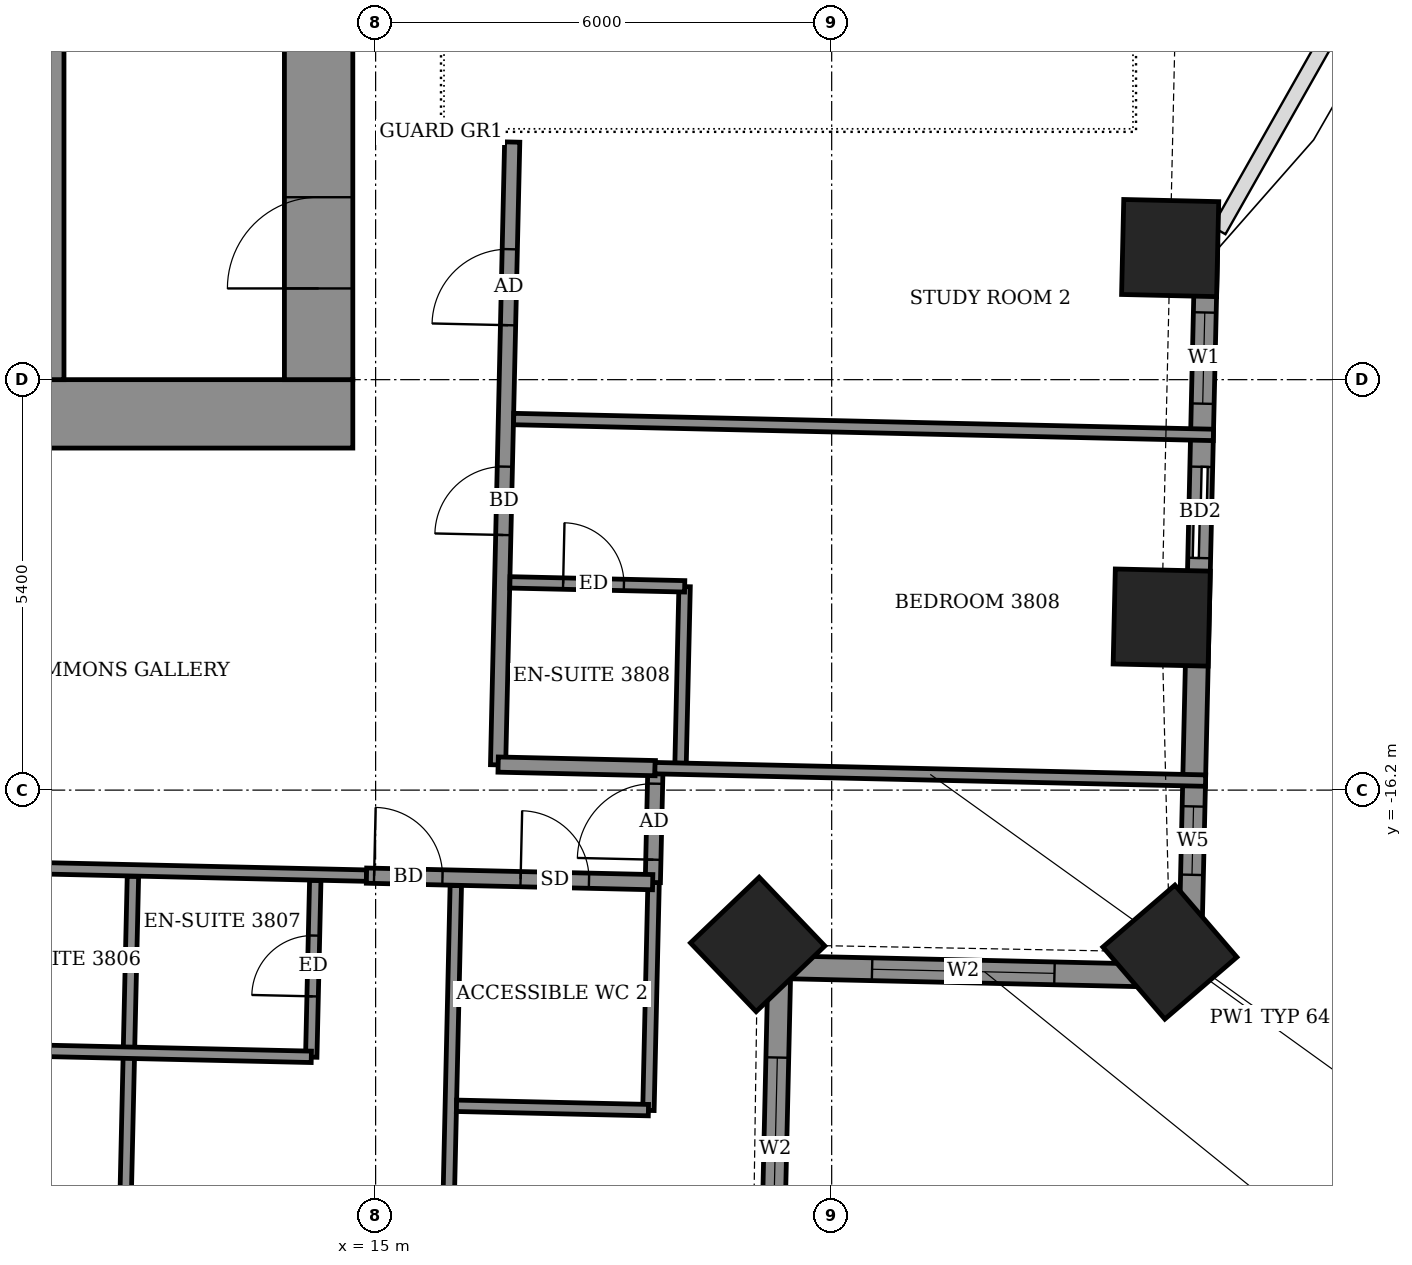
"""IFC4 building model, lengths in metres.
Left out: names, types, materials, properties, quantities, classifications, styles, units other than length and angle.
Written with IfcOpenShell. Run it as: python <this file> out.ifc"""

import sys

from ifc_helpers import new_model, si_unit, direction, frame, frame_2d, origin, origin_2d, place, context, subcontext, project, spatial, rectangle, extrude, element, fill, save


model = new_model("IFC4")
c1 = context("Model", 3, precision=1e-05, world=origin(), true_north=direction((0.0, 1.0)))
c2 = subcontext(c1, "Body", "Model", "MODEL_VIEW")
j1 = project(units=[si_unit("LENGTHUNIT", "METRE"), si_unit("PLANEANGLEUNIT", "RADIAN")], contexts=[c1])
p1 = place(None, origin())
s1 = spatial("IfcSite", under=j1, at=p1, CompositionType="ELEMENT")
p2 = place(p1, origin())
s2 = spatial("IfcBuilding", under=s1, at=p2, CompositionType="ELEMENT")
p3 = place(p2, frame((0.0, 0.0, 152.7)))
s3 = spatial("IfcBuildingStorey", under=s2, at=p3, CompositionType="ELEMENT", Elevation=152.7)
for number, where, z_axis, x_axis in (
    (1, (20.026, -18.23, -0.55), (0.0, 0.0, 1.0), (0.723, 0.691, 0.0)),
    (2, (25.449, -18.331, -0.55), (0.0, 0.0, 1.0), (0.758, 0.652, 0.0)),
    (3, (25.342, -13.93, -0.55), (0.0, 0.0, 1.0), (0.023, 1.0, 0.0)),
    (4, (25.453, -9.069, -0.55), (0.0, 0.0, 1.0), (0.023, 1.0, 0.0)),
):
    element("IfcColumn", number, at=place(p3, frame(where, z_axis=z_axis, x_axis=x_axis)), inside=s3, PredefinedType="COLUMN", context=c2, shape_type="SweptSolid", body=[
        extrude(rectangle(XDim=1.25, YDim=1.25, at=origin_2d()), origin(), (0.0, 0.0, 1.0), 3.6),
    ])
p4 = place(p3, frame((25.71, -18.651, 0.0), z_axis=(0.0, 0.0, 1.0), x_axis=(0.02274444447, 0.999741311663, 0.0)))
e5 = element("IfcWall", 5, at=p4, inside=s3, PredefinedType="SOLIDWALL", context=c2, shape_type="SweptSolid", body=[
    extrude(rectangle(XDim=9.628, YDim=0.3, at=frame_2d((4.814, 0.0))), origin(), (0.0, 0.0, 1.0), 2.55),
])
p5 = place(p4, frame((1.337, 0.0, 0.9)))
e6 = element("IfcOpeningElement", 6, at=p5, cuts=e5, PredefinedType="OPENING", context=c2, shape_type="SweptSolid", body=[
    extrude(rectangle(XDim=0.9, YDim=1.5, at=frame_2d((0.45, 0.75))), frame((0.0, 0.16, 0.0), z_axis=(0.0, -1.0, 0.0), x_axis=(1.0, 0.0, 0.0)), (0.0, 0.0, 1.0), 0.32),
])
p6 = place(p4, frame((5.506, 0.0, 0.0)))
e7 = element("IfcOpeningElement", 7, at=p6, cuts=e5, PredefinedType="OPENING", context=c2, shape_type="SweptSolid", body=[
    extrude(rectangle(XDim=1.2, YDim=2.4, at=frame_2d((0.6, 1.2))), frame((0.0, 0.16, 0.0), z_axis=(0.0, -1.0, 0.0), x_axis=(1.0, 0.0, 0.0)), (0.0, 0.0, 1.0), 0.32),
])
p7 = place(p4, frame((7.537, 0.0, 0.9)))
e8 = element("IfcOpeningElement", 8, at=p7, cuts=e5, PredefinedType="OPENING", context=c2, shape_type="SweptSolid", body=[
    extrude(rectangle(XDim=1.2, YDim=1.5, at=frame_2d((0.6, 0.75))), frame((0.0, 0.16, 0.0), z_axis=(0.0, -1.0, 0.0), x_axis=(1.0, 0.0, 0.0)), (0.0, 0.0, 1.0), 0.32),
])
p8 = place(p3, frame((20.189, -23.927, 0.0), z_axis=(0.0, 0.0, 1.0), x_axis=(0.022789195272, 0.999740292565, 0.0)))
e9 = element("IfcWall", 9, at=p8, inside=s3, PredefinedType="SOLIDWALL", context=c2, shape_type="SweptSolid", body=[
    extrude(rectangle(XDim=5.399, YDim=0.3, at=frame_2d((2.7, 0.0))), origin(), (0.0, 0.0, 1.0), 2.55),
])
p9 = place(p8, frame((1.81, 0.0, 0.9)))
e10 = element("IfcOpeningElement", 10, at=p9, cuts=e9, PredefinedType="OPENING", context=c2, shape_type="SweptSolid", body=[
    extrude(rectangle(XDim=2.4, YDim=1.5, at=frame_2d((1.2, 0.75))), frame((0.0, 0.16, 0.0), z_axis=(0.0, -1.0, 0.0), x_axis=(1.0, 0.0, 0.0)), (0.0, 0.0, 1.0), 0.32),
])
p10 = place(p3, frame((20.312, -18.529, 0.0), z_axis=(0.0, 0.0, 1.0), x_axis=(0.999745417973, -0.02256322766, 0.0)))
e11 = element("IfcWall", 11, at=p10, inside=s3, PredefinedType="SOLIDWALL", context=c2, shape_type="SweptSolid", body=[
    extrude(rectangle(XDim=5.399, YDim=0.3, at=frame_2d((2.7, 0.0))), origin(), (0.0, 0.0, 1.0), 2.55),
])
p11 = place(p10, frame((1.22, 0.0, 0.9)))
e12 = element("IfcOpeningElement", 12, at=p11, cuts=e11, PredefinedType="OPENING", context=c2, shape_type="SweptSolid", body=[
    extrude(rectangle(XDim=2.4, YDim=1.5, at=frame_2d((1.2, 0.75))), frame((0.0, 0.16, 0.0), z_axis=(0.0, -1.0, 0.0), x_axis=(1.0, 0.0, 0.0)), (0.0, 0.0, 1.0), 0.32),
])
p12 = place(p3, frame((11.658, -23.884, 0.0), z_axis=(0.0, 0.0, 1.0), x_axis=(0.022734104141, 0.999741546855, 0.0)))
e13 = element("IfcWall", 13, at=p12, inside=s3, PredefinedType="PARTITIONING", context=c2, shape_type="SweptSolid", body=[
    extrude(rectangle(XDim=6.551, YDim=0.15, at=frame_2d((3.275, 0.0))), origin(), (0.0, 0.0, 1.0), 2.55),
])
p13 = place(p3, frame((15.907, -23.98, 0.0), z_axis=(0.0, 0.0, 1.0), x_axis=(0.022672114006, 0.999742954587, 0.0)))
e14 = element("IfcWall", 14, at=p13, inside=s3, PredefinedType="PARTITIONING", context=c2, shape_type="SweptSolid", body=[
    extrude(rectangle(XDim=6.526, YDim=0.15, at=frame_2d((3.263, 0.0))), origin(), (0.0, 0.0, 1.0), 2.55),
])
p14 = place(p3, frame((18.589, -20.414, 0.0), z_axis=(0.0, 0.0, 1.0), x_axis=(0.022625271604, 0.999744015778, 0.0)))
e15 = element("IfcWall", 15, at=p14, inside=s3, PredefinedType="PARTITIONING", context=c2, shape_type="SweptSolid", body=[
    extrude(rectangle(XDim=3.0, YDim=0.15, at=frame_2d((1.5, 0.0))), origin(), (0.0, 0.0, 1.0), 3.05),
])
p15 = place(p3, frame((16.064, -20.353, 0.0), z_axis=(0.0, 0.0, 1.0), x_axis=(0.999746356616, -0.022521599255, 0.0)))
e16 = element("IfcWall", 16, at=p15, inside=s3, PredefinedType="PARTITIONING", context=c2, shape_type="SweptSolid", body=[
    extrude(rectangle(XDim=2.526, YDim=0.15, at=frame_2d((1.263, 0.0))), origin(), (0.0, 0.0, 1.0), 3.05),
])
p16 = place(p3, frame((14.153, -19.713, 0.0), z_axis=(0.0, 0.0, 1.0), x_axis=(0.02279059109, 0.999740260747, 0.0)))
e17 = element("IfcWall", 17, at=p16, inside=s3, PredefinedType="PARTITIONING", context=c2, shape_type="SweptSolid", body=[
    extrude(rectangle(XDim=2.324, YDim=0.15, at=frame_2d((1.162, 0.0))), origin(), (0.0, 0.0, 1.0), 3.05),
])
p17 = place(p16, frame((0.8, 0.0, 0.0)))
e18 = element("IfcOpeningElement", 18, at=p17, cuts=e17, PredefinedType="OPENING", context=c2, shape_type="SweptSolid", body=[
    extrude(rectangle(XDim=0.8, YDim=2.1, at=frame_2d((0.4, 1.05))), frame((0.0, 0.085, 0.0), z_axis=(0.0, -1.0, 0.0), x_axis=(1.0, 0.0, 0.0)), (0.0, 0.0, 1.0), 0.17),
])
p18 = place(p3, frame((9.355, -19.601, 0.0), z_axis=(0.0, 0.0, 1.0), x_axis=(0.999747294078, -0.022479946278, 0.0)))
e19 = element("IfcWall", 19, at=p18, inside=s3, PredefinedType="PARTITIONING", context=c2, shape_type="SweptSolid", body=[
    extrude(rectangle(XDim=4.8, YDim=0.15, at=frame_2d((2.4, 0.0))), origin(), (0.0, 0.0, 1.0), 3.05),
])
p19 = place(p3, frame((18.647, -17.415, 0.0), z_axis=(0.0, 0.0, 1.0), x_axis=(0.022617910375, 0.999744182344, 0.0)))
e20 = element("IfcWall", 20, at=p19, inside=s3, PredefinedType="PARTITIONING", context=c2, shape_type="SweptSolid", body=[
    extrude(rectangle(XDim=1.5, YDim=0.2, at=frame_2d((0.75, 0.0))), origin(), (0.0, 0.0, 1.0), 3.05),
])
p20 = place(p19, frame((0.3, 0.0, 0.0)))
e21 = element("IfcOpeningElement", 21, at=p20, cuts=e20, PredefinedType="OPENING", context=c2, shape_type="SweptSolid", body=[
    extrude(rectangle(XDim=1.0, YDim=2.1, at=frame_2d((0.5, 1.05))), frame((0.0, 0.11, 0.0), z_axis=(0.0, -1.0, 0.0), x_axis=(1.0, 0.0, 0.0)), (0.0, 0.0, 1.0), 0.22),
])
p21 = place(p3, frame((-15.649, -16.633, 0.0), z_axis=(0.0, 0.0, 1.0), x_axis=(0.999743261737, -0.022658565952, 0.0)))
e22 = element("IfcWall", 22, at=p21, inside=s3, PredefinedType="PARTITIONING", context=c2, shape_type="SweptSolid", body=[
    extrude(rectangle(XDim=30.536, YDim=0.15, at=frame_2d((15.268, 0.0))), origin(), (0.0, 0.0, 1.0), 3.05),
])
p22 = place(p21, frame((0.2, 0.0, 0.0)))
e23 = element("IfcOpeningElement", 23, at=p22, cuts=e22, PredefinedType="OPENING", context=c2, shape_type="SweptSolid", body=[
    extrude(rectangle(XDim=0.9, YDim=2.1, at=frame_2d((0.45, 1.05))), frame((0.0, 0.085, 0.0), z_axis=(0.0, -1.0, 0.0), x_axis=(1.0, 0.0, 0.0)), (0.0, 0.0, 1.0), 0.17),
])
p23 = place(p21, frame((4.465, 0.0, 0.0)))
e24 = element("IfcOpeningElement", 24, at=p23, cuts=e22, PredefinedType="OPENING", context=c2, shape_type="SweptSolid", body=[
    extrude(rectangle(XDim=0.9, YDim=2.1, at=frame_2d((0.45, 1.05))), frame((0.0, 0.085, 0.0), z_axis=(0.0, -1.0, 0.0), x_axis=(1.0, 0.0, 0.0)), (0.0, 0.0, 1.0), 0.17),
])
p24 = place(p21, frame((6.315, 0.0, 0.0)))
e25 = element("IfcOpeningElement", 25, at=p24, cuts=e22, PredefinedType="OPENING", context=c2, shape_type="SweptSolid", body=[
    extrude(rectangle(XDim=0.9, YDim=2.1, at=frame_2d((0.45, 1.05))), frame((0.0, 0.085, 0.0), z_axis=(0.0, -1.0, 0.0), x_axis=(1.0, 0.0, 0.0)), (0.0, 0.0, 1.0), 0.17),
])
p25 = place(p21, frame((13.04, 0.0, 0.0)))
e26 = element("IfcOpeningElement", 26, at=p25, cuts=e22, PredefinedType="OPENING", context=c2, shape_type="SweptSolid", body=[
    extrude(rectangle(XDim=0.9, YDim=2.1, at=frame_2d((0.45, 1.05))), frame((0.0, 0.085, 0.0), z_axis=(0.0, -1.0, 0.0), x_axis=(1.0, 0.0, 0.0)), (0.0, 0.0, 1.0), 0.17),
])
p26 = place(p21, frame((15.015, 0.0, 0.0)))
e27 = element("IfcOpeningElement", 27, at=p26, cuts=e22, PredefinedType="OPENING", context=c2, shape_type="SweptSolid", body=[
    extrude(rectangle(XDim=0.9, YDim=2.1, at=frame_2d((0.45, 1.05))), frame((0.0, 0.085, 0.0), z_axis=(0.0, -1.0, 0.0), x_axis=(1.0, 0.0, 0.0)), (0.0, 0.0, 1.0), 0.17),
])
p27 = place(p21, frame((21.74, 0.0, 0.0)))
e28 = element("IfcOpeningElement", 28, at=p27, cuts=e22, PredefinedType="OPENING", context=c2, shape_type="SweptSolid", body=[
    extrude(rectangle(XDim=0.9, YDim=2.1, at=frame_2d((0.45, 1.05))), frame((0.0, 0.085, 0.0), z_axis=(0.0, -1.0, 0.0), x_axis=(1.0, 0.0, 0.0)), (0.0, 0.0, 1.0), 0.17),
])
p28 = place(p21, frame((23.665, 0.0, 0.0)))
e29 = element("IfcOpeningElement", 29, at=p28, cuts=e22, PredefinedType="OPENING", context=c2, shape_type="SweptSolid", body=[
    extrude(rectangle(XDim=0.9, YDim=2.1, at=frame_2d((0.45, 1.05))), frame((0.0, 0.085, 0.0), z_axis=(0.0, -1.0, 0.0), x_axis=(1.0, 0.0, 0.0)), (0.0, 0.0, 1.0), 0.17),
])
p29 = place(p3, frame((14.88, -17.325, 0.0), z_axis=(0.0, 0.0, 1.0), x_axis=(0.999739622, -0.022818593369, 0.0)))
e30 = element("IfcWall", 30, at=p29, inside=s3, PredefinedType="PARTITIONING", context=c2, shape_type="SweptSolid", body=[
    extrude(rectangle(XDim=3.766, YDim=0.2, at=frame_2d((1.883, 0.0))), origin(), (0.0, 0.0, 1.0), 3.05),
])
p30 = place(p29, frame((0.1, 0.0, 0.0)))
e31 = element("IfcOpeningElement", 31, at=p30, cuts=e30, PredefinedType="OPENING", context=c2, shape_type="SweptSolid", body=[
    extrude(rectangle(XDim=0.9, YDim=2.1, at=frame_2d((0.45, 1.05))), frame((0.0, 0.11, 0.0), z_axis=(0.0, -1.0, 0.0), x_axis=(1.0, 0.0, 0.0)), (0.0, 0.0, 1.0), 0.22),
])
p31 = place(p29, frame((2.028, 0.0, 0.0)))
e32 = element("IfcOpeningElement", 32, at=p31, cuts=e30, PredefinedType="OPENING", context=c2, shape_type="SweptSolid", body=[
    extrude(rectangle(XDim=0.9, YDim=2.1, at=frame_2d((0.45, 1.05))), frame((0.0, 0.11, 0.0), z_axis=(0.0, -1.0, 0.0), x_axis=(1.0, 0.0, 0.0)), (0.0, 0.0, 1.0), 0.22),
])
p32 = place(p3, frame((16.611, -15.868, 0.0), z_axis=(0.0, 0.0, 1.0), x_axis=(0.022698399288, 0.999742358145, 0.0)))
e33 = element("IfcWall", 33, at=p32, inside=s3, PredefinedType="PARTITIONING", context=c2, shape_type="SweptSolid", body=[
    extrude(rectangle(XDim=8.196, YDim=0.2, at=frame_2d((4.098, 0.0))), origin(), (0.0, 0.0, 1.0), 3.05),
])
p33 = place(p32, frame((3.025, 0.0, 0.0)))
e34 = element("IfcOpeningElement", 34, at=p33, cuts=e33, PredefinedType="OPENING", context=c2, shape_type="SweptSolid", body=[
    extrude(rectangle(XDim=0.9, YDim=2.1, at=frame_2d((0.45, 1.05))), frame((0.0, 0.11, 0.0), z_axis=(0.0, -1.0, 0.0), x_axis=(1.0, 0.0, 0.0)), (0.0, 0.0, 1.0), 0.22),
])
p34 = place(p32, frame((5.786, 0.0, 0.0)))
e35 = element("IfcOpeningElement", 35, at=p34, cuts=e33, PredefinedType="OPENING", context=c2, shape_type="SweptSolid", body=[
    extrude(rectangle(XDim=1.0, YDim=2.1, at=frame_2d((0.5, 1.05))), frame((0.0, 0.11, 0.0), z_axis=(0.0, -1.0, 0.0), x_axis=(1.0, 0.0, 0.0)), (0.0, 0.0, 1.0), 0.22),
])
p35 = place(p3, frame((19.012, -15.848, 0.0), z_axis=(0.0, 0.0, 1.0), x_axis=(0.022781023197, 0.999740478815, 0.0)))
e36 = element("IfcWall", 36, at=p35, inside=s3, PredefinedType="PARTITIONING", context=c2, shape_type="SweptSolid", body=[
    extrude(rectangle(XDim=2.325, YDim=0.15, at=frame_2d((1.163, 0.0))), origin(), (0.0, 0.0, 1.0), 3.05),
])
p36 = place(p3, frame((16.612, -15.864, 0.0), z_axis=(0.0, 0.0, 1.0), x_axis=(0.999742931749, -0.02267312106, 0.0)))
e37 = element("IfcWall", 37, at=p36, inside=s3, PredefinedType="PARTITIONING", context=c2, shape_type="SweptSolid", body=[
    extrude(rectangle(XDim=2.067, YDim=0.2, at=frame_2d((1.034, 0.0))), origin(), (0.0, 0.0, 1.0), 3.05),
])
p37 = place(p3, frame((18.675, -15.911, 0.0), z_axis=(0.0, 0.0, 1.0), x_axis=(0.999743624132, -0.022642570706, 0.0)))
e38 = element("IfcWall", 38, at=p37, inside=s3, PredefinedType="PARTITIONING", context=c2, shape_type="SweptSolid", body=[
    extrude(rectangle(XDim=7.246, YDim=0.15, at=frame_2d((3.623, 0.0))), origin(), (0.0, 0.0, 1.0), 2.55),
])
p38 = place(p3, frame((16.767, -13.467, 0.0), z_axis=(0.0, 0.0, 1.0), x_axis=(0.999744241736, -0.022615284993, 0.0)))
e39 = element("IfcWall", 39, at=p38, inside=s3, PredefinedType="PARTITIONING", context=c2, shape_type="SweptSolid", body=[
    extrude(rectangle(XDim=2.299, YDim=0.15, at=frame_2d((1.15, 0.0))), origin(), (0.0, 0.0, 1.0), 3.05),
])
p39 = place(p38, frame((0.7, 0.0, 0.0)))
e40 = element("IfcOpeningElement", 40, at=p39, cuts=e39, PredefinedType="OPENING", context=c2, shape_type="SweptSolid", body=[
    extrude(rectangle(XDim=0.8, YDim=2.1, at=frame_2d((0.4, 1.05))), frame((0.0, 0.085, 0.0), z_axis=(0.0, -1.0, 0.0), x_axis=(1.0, 0.0, 0.0)), (0.0, 0.0, 1.0), 0.17),
])
p40 = place(p3, frame((16.816, -11.318, 0.0), z_axis=(0.0, 0.0, 1.0), x_axis=(0.999742437445, -0.022694906292, 0.0)))
e41 = element("IfcWall", 41, at=p40, inside=s3, PredefinedType="PARTITIONING", context=c2, shape_type="SweptSolid", body=[
    extrude(rectangle(XDim=9.208, YDim=0.15, at=frame_2d((4.604, 0.0))), origin(), (0.0, 0.0, 1.0), 2.55),
])
p41 = place(p3, frame((-14.7, -11.25, 0.0), z_axis=(0.0, 0.0, 1.0), x_axis=(1.0, 0.0, 0.0)))
e42 = element("IfcWall", 42, at=p41, inside=s3, PredefinedType="SHEAR", context=c2, shape_type="SweptSolid", body=[
    extrude(rectangle(XDim=29.4, YDim=0.9, at=frame_2d((14.7, 0.0))), origin(), (0.0, 0.0, 1.0), 3.6),
])
p42 = place(p3, frame((14.25, -10.8, 0.0), z_axis=(0.0, 0.0, 1.0), x_axis=(0.0, 1.0, 0.0)))
e43 = element("IfcWall", 43, at=p42, inside=s3, PredefinedType="SHEAR", context=c2, shape_type="SweptSolid", body=[
    extrude(rectangle(XDim=21.6, YDim=0.9, at=frame_2d((10.8, 0.0))), origin(), (0.0, 0.0, 1.0), 3.6),
])
p43 = place(p42, frame((1.2, 0.0, 0.0)))
e44 = element("IfcOpeningElement", 44, at=p43, cuts=e43, PredefinedType="OPENING", context=c2, shape_type="SweptSolid", body=[
    extrude(rectangle(XDim=1.2, YDim=2.1, at=frame_2d((0.6, 1.05))), frame((0.0, 0.46, 0.0), z_axis=(0.0, -1.0, 0.0), x_axis=(1.0, 0.0, 0.0)), (0.0, 0.0, 1.0), 0.92),
])
p44 = place(p3, frame((10.8, -10.8, 0.0), z_axis=(0.0, 0.0, 1.0), x_axis=(0.0, 1.0, 0.0)))
e45 = element("IfcWall", 45, at=p44, inside=s3, PredefinedType="SHEAR", context=c2, shape_type="SweptSolid", body=[
    extrude(rectangle(XDim=7.5, YDim=0.2, at=frame_2d((3.75, 0.0))), origin(), (0.0, 0.0, 1.0), 3.05),
])
p45 = place(p5, origin())
e46 = element("IfcWindow", 46, at=p45, inside=s3, PartitioningType="SINGLE_PANEL", PredefinedType="WINDOW", context=c2, shape_type="SweptSolid", body=[
    extrude(rectangle(XDim=0.9, YDim=1.5, at=frame_2d((0.45, 0.75))), frame((0.0, 0.03, 0.0), z_axis=(0.0, -1.0, 0.0), x_axis=(1.0, 0.0, 0.0)), (0.0, 0.0, 1.0), 0.06),
])
fill(e6, e46)
p46 = place(p6, origin())
e47 = element("IfcDoor", 47, at=p46, inside=s3, OperationType="SLIDING_TO_LEFT", PredefinedType="DOOR", context=c2, shape_type="SweptSolid", body=[
    extrude(rectangle(XDim=1.2, YDim=2.4, at=frame_2d((0.6, 1.2))), frame((0.0, 0.025, 0.0), z_axis=(0.0, -1.0, 0.0), x_axis=(1.0, 0.0, 0.0)), (0.0, 0.0, 1.0), 0.05),
])
fill(e7, e47)
p47 = place(p7, origin())
e48 = element("IfcWindow", 48, at=p47, inside=s3, PartitioningType="SINGLE_PANEL", PredefinedType="WINDOW", context=c2, shape_type="SweptSolid", body=[
    extrude(rectangle(XDim=1.2, YDim=1.5, at=frame_2d((0.6, 0.75))), frame((0.0, 0.03, 0.0), z_axis=(0.0, -1.0, 0.0), x_axis=(1.0, 0.0, 0.0)), (0.0, 0.0, 1.0), 0.06),
])
fill(e8, e48)
p48 = place(p9, origin())
e49 = element("IfcWindow", 49, at=p48, inside=s3, PartitioningType="DOUBLE_PANEL_VERTICAL", PredefinedType="WINDOW", context=c2, shape_type="SweptSolid", body=[
    extrude(rectangle(XDim=2.4, YDim=1.5, at=frame_2d((1.2, 0.75))), frame((0.0, 0.03, 0.0), z_axis=(0.0, -1.0, 0.0), x_axis=(1.0, 0.0, 0.0)), (0.0, 0.0, 1.0), 0.06),
])
fill(e10, e49)
p49 = place(p11, origin())
e50 = element("IfcWindow", 50, at=p49, inside=s3, PartitioningType="DOUBLE_PANEL_VERTICAL", PredefinedType="WINDOW", context=c2, shape_type="SweptSolid", body=[
    extrude(rectangle(XDim=2.4, YDim=1.5, at=frame_2d((1.2, 0.75))), frame((0.0, 0.03, 0.0), z_axis=(0.0, -1.0, 0.0), x_axis=(1.0, 0.0, 0.0)), (0.0, 0.0, 1.0), 0.06),
])
fill(e12, e50)
p50 = place(p30, origin())
e51 = element("IfcDoor", 51, at=p50, inside=s3, OperationType="SINGLE_SWING_LEFT", PredefinedType="DOOR", context=c2, shape_type="SweptSolid", body=[
    extrude(rectangle(XDim=0.9, YDim=2.1, at=frame_2d((0.45, 1.05))), frame((0.0, 0.025, 0.0), z_axis=(0.0, -1.0, 0.0), x_axis=(1.0, 0.0, 0.0)), (0.0, 0.0, 1.0), 0.05),
])
fill(e31, e51)
p51 = place(p17, origin())
e52 = element("IfcDoor", 52, at=p51, inside=s3, OperationType="SINGLE_SWING_LEFT", PredefinedType="DOOR", context=c2, shape_type="SweptSolid", body=[
    extrude(rectangle(XDim=0.8, YDim=2.1, at=frame_2d((0.4, 1.05))), frame((0.0, 0.025, 0.0), z_axis=(0.0, -1.0, 0.0), x_axis=(1.0, 0.0, 0.0)), (0.0, 0.0, 1.0), 0.05),
])
fill(e18, e52)
p52 = place(p20, origin())
e53 = element("IfcDoor", 53, at=p52, inside=s3, OperationType="SINGLE_SWING_RIGHT", PredefinedType="DOOR", context=c2, shape_type="SweptSolid", body=[
    extrude(rectangle(XDim=1.0, YDim=2.1, at=frame_2d((0.5, 1.05))), frame((0.0, 0.025, 0.0), z_axis=(0.0, -1.0, 0.0), x_axis=(1.0, 0.0, 0.0)), (0.0, 0.0, 1.0), 0.05),
])
fill(e21, e53)
p53 = place(p31, origin())
e54 = element("IfcDoor", 54, at=p53, inside=s3, OperationType="SINGLE_SWING_RIGHT", PredefinedType="DOOR", context=c2, shape_type="SweptSolid", body=[
    extrude(rectangle(XDim=0.9, YDim=2.1, at=frame_2d((0.45, 1.05))), frame((0.0, 0.025, 0.0), z_axis=(0.0, -1.0, 0.0), x_axis=(1.0, 0.0, 0.0)), (0.0, 0.0, 1.0), 0.05),
])
fill(e32, e54)
p54 = place(p33, origin())
e55 = element("IfcDoor", 55, at=p54, inside=s3, OperationType="SINGLE_SWING_RIGHT", PredefinedType="DOOR", context=c2, shape_type="SweptSolid", body=[
    extrude(rectangle(XDim=0.9, YDim=2.1, at=frame_2d((0.45, 1.05))), frame((0.0, 0.025, 0.0), z_axis=(0.0, -1.0, 0.0), x_axis=(1.0, 0.0, 0.0)), (0.0, 0.0, 1.0), 0.05),
])
fill(e34, e55)
p55 = place(p39, origin())
e56 = element("IfcDoor", 56, at=p55, inside=s3, OperationType="SINGLE_SWING_RIGHT", PredefinedType="DOOR", context=c2, shape_type="SweptSolid", body=[
    extrude(rectangle(XDim=0.8, YDim=2.1, at=frame_2d((0.4, 1.05))), frame((0.0, 0.025, 0.0), z_axis=(0.0, -1.0, 0.0), x_axis=(1.0, 0.0, 0.0)), (0.0, 0.0, 1.0), 0.05),
])
fill(e40, e56)
p56 = place(p34, origin())
e57 = element("IfcDoor", 57, at=p56, inside=s3, OperationType="SINGLE_SWING_LEFT", PredefinedType="DOOR", context=c2, shape_type="SweptSolid", body=[
    extrude(rectangle(XDim=1.0, YDim=2.1, at=frame_2d((0.5, 1.05))), frame((0.0, 0.025, 0.0), z_axis=(0.0, -1.0, 0.0), x_axis=(1.0, 0.0, 0.0)), (0.0, 0.0, 1.0), 0.05),
])
fill(e35, e57)
p57 = place(p43, origin())
e58 = element("IfcDoor", 58, at=p57, inside=s3, OperationType="DOUBLE_DOOR_SINGLE_SWING", PredefinedType="DOOR", context=c2, shape_type="SweptSolid", body=[
    extrude(rectangle(XDim=1.2, YDim=2.1, at=frame_2d((0.6, 1.05))), frame((0.0, 0.025, 0.0), z_axis=(0.0, -1.0, 0.0), x_axis=(1.0, 0.0, 0.0)), (0.0, 0.0, 1.0), 0.05),
])
fill(e44, e58)
save(model, sys.argv[1])
